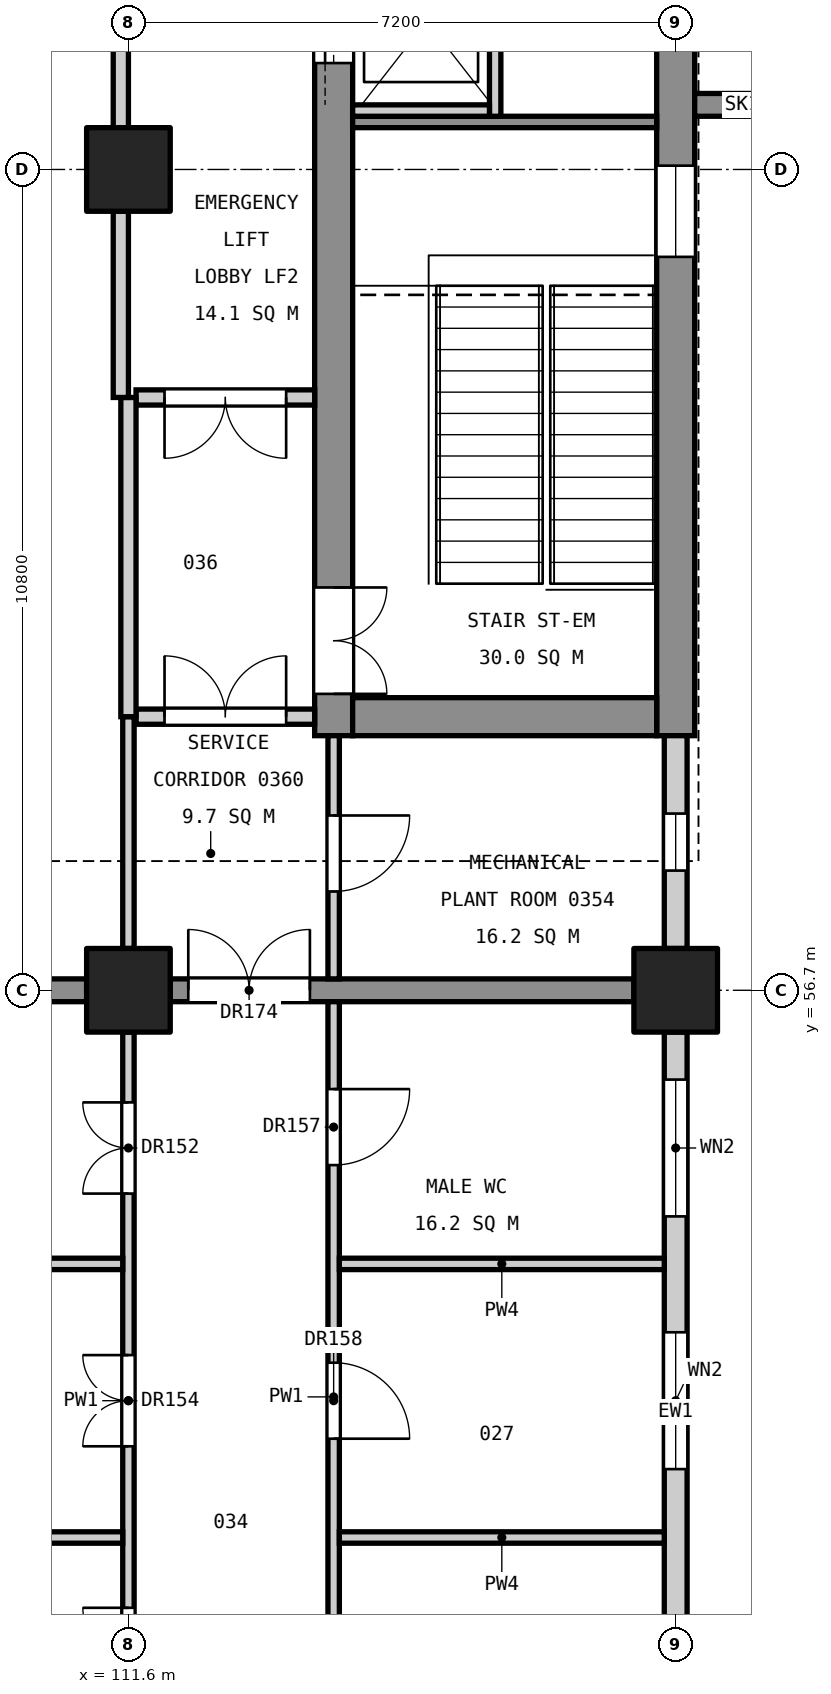
"""IFC4 building model, lengths in metres.
Left out: names, types, materials, properties, quantities, classifications, styles, units other than length and angle.
Written with IfcOpenShell. Run it as: python <this file> out.ifc"""

import sys

from ifc_helpers import new_model, si_unit, direction, frame, frame_2d, origin, origin_2d, place, context, subcontext, project, spatial, rectangle, extrude, element, fill, save


model = new_model("IFC4")
c1 = context("Model", 3, precision=1e-05, world=origin(), true_north=direction((0.0, 1.0)))
c2 = subcontext(c1, "Body", "Model", "MODEL_VIEW")
j1 = project(units=[si_unit("LENGTHUNIT", "METRE"), si_unit("PLANEANGLEUNIT", "RADIAN")], contexts=[c1])
p1 = place(None, origin())
s1 = spatial("IfcSite", under=j1, at=p1, CompositionType="ELEMENT")
p2 = place(p1, origin())
s2 = spatial("IfcBuilding", under=s1, at=p2, CompositionType="ELEMENT")
p3 = place(p2, frame((0.0, 0.0, 16.8)))
s3 = spatial("IfcBuildingStorey", under=s2, at=p3, CompositionType="ELEMENT", Elevation=16.8)
for number, where, z_axis, x_axis in (
    (1, (118.8, 56.7, 0.0), (0.0, 0.0, 1.0), (1.0, 0.0, 0.0)),
    (2, (111.6, 56.7, 0.0), (0.0, 0.0, 1.0), (1.0, 0.0, 0.0)),
    (3, (111.6, 67.5, 0.0), (0.0, 0.0, 1.0), (1.0, 0.0, 0.0)),
):
    element("IfcColumn", number, at=place(p3, frame(where, z_axis=z_axis, x_axis=x_axis)), inside=s3, PredefinedType="COLUMN", context=c2, shape_type="SweptSolid", body=[
        extrude(rectangle(XDim=1.1, YDim=1.1, at=origin_2d()), origin(), (0.0, 0.0, 1.0), 5.4),
    ])
p4 = place(p3, frame((118.8, 60.05, 0.0), z_axis=(0.0, 0.0, 1.0), x_axis=(0.0, 1.0, 0.0)))
e4 = element("IfcWall", 4, at=p4, inside=s3, PredefinedType="SHEAR", context=c2, shape_type="SweptSolid", body=[
    extrude(rectangle(XDim=14.9, YDim=0.5, at=frame_2d((7.45, 0.0))), origin(), (0.0, 0.0, 1.0), 5.15),
])
p5 = place(p4, frame((6.3, 0.0, 3.4)))
e5 = element("IfcOpeningElement", 5, at=p5, cuts=e4, PredefinedType="OPENING", context=c2, shape_type="SweptSolid", body=[
    extrude(rectangle(XDim=1.2, YDim=0.9, at=frame_2d((0.6, 0.45))), frame((0.0, 0.26, 0.0), z_axis=(0.0, -1.0, 0.0), x_axis=(1.0, 0.0, 0.0)), (0.0, 0.0, 1.0), 0.52),
])
p6 = place(p3, frame((114.3, 60.05, 0.0), z_axis=(0.0, 0.0, 1.0), x_axis=(0.0, 1.0, 0.0)))
e6 = element("IfcWall", 6, at=p6, inside=s3, PredefinedType="SHEAR", context=c2, shape_type="SweptSolid", body=[
    extrude(rectangle(XDim=14.9, YDim=0.5, at=frame_2d((7.45, 0.0))), origin(), (0.0, 0.0, 1.0), 5.15),
])
p7 = place(p6, frame((0.55, 0.0, 0.0)))
e7 = element("IfcOpeningElement", 7, at=p7, cuts=e6, PredefinedType="OPENING", context=c2, shape_type="SweptSolid", body=[
    extrude(rectangle(XDim=1.4, YDim=2.1, at=frame_2d((0.7, 1.05))), frame((0.0, 0.26, 0.0), z_axis=(0.0, -1.0, 0.0), x_axis=(1.0, 0.0, 0.0)), (0.0, 0.0, 1.0), 0.52),
])
p8 = place(p6, frame((8.85, 0.0, 0.0)))
e8 = element("IfcOpeningElement", 8, at=p8, cuts=e6, PredefinedType="OPENING", context=c2, shape_type="SweptSolid", body=[
    extrude(rectangle(XDim=1.1, YDim=2.1, at=frame_2d((0.55, 1.05))), frame((0.0, 0.26, 0.0), z_axis=(0.0, -1.0, 0.0), x_axis=(1.0, 0.0, 0.0)), (0.0, 0.0, 1.0), 0.52),
])
p9 = place(p6, frame((11.4, 0.0, 0.0)))
e9 = element("IfcOpeningElement", 9, at=p9, cuts=e6, PredefinedType="OPENING", context=c2, shape_type="SweptSolid", body=[
    extrude(rectangle(XDim=1.1, YDim=2.1, at=frame_2d((0.55, 1.05))), frame((0.0, 0.26, 0.0), z_axis=(0.0, -1.0, 0.0), x_axis=(1.0, 0.0, 0.0)), (0.0, 0.0, 1.0), 0.52),
])
p10 = place(p3, frame((118.55, 60.3, 0.0), z_axis=(0.0, 0.0, 1.0), x_axis=(-1.0, 0.0, 0.0)))
e10 = element("IfcWall", 10, at=p10, inside=s3, PredefinedType="SHEAR", context=c2, shape_type="SweptSolid", body=[
    extrude(rectangle(XDim=4.0, YDim=0.5, at=frame_2d((2.0, 0.0))), origin(), (0.0, 0.0, 1.0), 5.15),
])
p11 = place(p3, frame((119.05, 68.35, 0.0), z_axis=(0.0, 0.0, 1.0), x_axis=(1.0, 0.0, 0.0)))
e11 = element("IfcWall", 11, at=p11, inside=s3, PredefinedType="SHEAR", context=c2, shape_type="SweptSolid", body=[
    extrude(rectangle(XDim=1.25, YDim=0.3, at=frame_2d((0.625, 0.0))), origin(), (0.0, 0.0, 1.0), 5.4),
])
p12 = place(p3, frame((118.25, 56.7, 0.0), z_axis=(0.0, 0.0, 1.0), x_axis=(-1.0, 0.0, 0.0)))
e12 = element("IfcWall", 12, at=p12, inside=s3, PredefinedType="SHEAR", context=c2, shape_type="SweptSolid", body=[
    extrude(rectangle(XDim=6.1, YDim=0.3, at=frame_2d((3.05, 0.0))), origin(), (0.0, 0.0, 1.0), 5.15),
])
p13 = place(p12, frame((4.262, 0.0, 0.0)))
e13 = element("IfcOpeningElement", 13, at=p13, cuts=e12, PredefinedType="OPENING", context=c2, shape_type="SweptSolid", body=[
    extrude(rectangle(XDim=1.6, YDim=2.1, at=frame_2d((0.8, 1.05))), frame((0.0, 0.16, 0.0), z_axis=(0.0, -1.0, 0.0), x_axis=(1.0, 0.0, 0.0)), (0.0, 0.0, 1.0), 0.32),
])
p14 = place(p3, frame((111.05, 56.7, 0.0), z_axis=(0.0, 0.0, 1.0), x_axis=(-1.0, 0.0, 0.0)))
e14 = element("IfcWall", 14, at=p14, inside=s3, PredefinedType="SHEAR", context=c2, shape_type="SweptSolid", body=[
    extrude(rectangle(XDim=9.7, YDim=0.3, at=frame_2d((4.85, 0.0))), origin(), (0.0, 0.0, 1.0), 5.15),
])
p15 = place(p3, frame((118.55, 68.125, 0.0), z_axis=(0.0, 0.0, 1.0), x_axis=(-1.0, 0.0, 0.0)))
e15 = element("IfcWall", 15, at=p15, inside=s3, PredefinedType="SOLIDWALL", context=c2, shape_type="SweptSolid", body=[
    extrude(rectangle(XDim=4.0, YDim=0.15, at=frame_2d((2.0, 0.0))), origin(), (0.0, 0.0, 1.0), 5.15),
])
p16 = place(p3, frame((116.425, 68.2, 0.0), z_axis=(0.0, 0.0, 1.0), x_axis=(0.0, 1.0, 0.0)))
e16 = element("IfcWall", 16, at=p16, inside=s3, PredefinedType="SOLIDWALL", context=c2, shape_type="SweptSolid", body=[
    extrude(rectangle(XDim=2.5, YDim=0.15, at=frame_2d((1.25, 0.0))), origin(), (0.0, 0.0, 1.0), 5.4),
])
p17 = place(p3, frame((116.35, 68.275, 0.0), z_axis=(0.0, 0.0, 1.0), x_axis=(-1.0, 0.0, 0.0)))
e17 = element("IfcWall", 17, at=p17, inside=s3, PredefinedType="SOLIDWALL", context=c2, shape_type="SweptSolid", body=[
    extrude(rectangle(XDim=1.8, YDim=0.15, at=frame_2d((0.9, 0.0))), origin(), (0.0, 0.0, 1.0), 5.4),
])
p18 = place(p3, frame((118.8, 46.15, 0.0), z_axis=(0.0, 0.0, 1.0), x_axis=(0.0, 1.0, 0.0)))
e18 = element("IfcWall", 18, at=p18, inside=s3, PredefinedType="STANDARD", context=c2, shape_type="SweptSolid", body=[
    extrude(rectangle(XDim=10.0, YDim=0.3, at=frame_2d((5.0, 0.0))), origin(), (0.0, 0.0, 1.0), 4.25),
])
p19 = place(p18, frame((1.3, 0.0, 0.8)))
e19 = element("IfcOpeningElement", 19, at=p19, cuts=e18, PredefinedType="OPENING", context=c2, shape_type="SweptSolid", body=[
    extrude(rectangle(XDim=0.75, YDim=1.2, at=frame_2d((0.375, 0.6))), frame((0.0, 0.16, 0.0), z_axis=(0.0, -1.0, 0.0), x_axis=(1.0, 0.0, 0.0)), (0.0, 0.0, 1.0), 0.32),
])
p20 = place(p18, frame((4.25, 0.0, 0.9)))
e20 = element("IfcOpeningElement", 20, at=p20, cuts=e18, PredefinedType="OPENING", context=c2, shape_type="SweptSolid", body=[
    extrude(rectangle(XDim=1.8, YDim=3.0, at=frame_2d((0.9, 1.5))), frame((0.0, 0.16, 0.0), z_axis=(0.0, -1.0, 0.0), x_axis=(1.0, 0.0, 0.0)), (0.0, 0.0, 1.0), 0.32),
])
p21 = place(p18, frame((7.575, 0.0, 0.9)))
e21 = element("IfcOpeningElement", 21, at=p21, cuts=e18, PredefinedType="OPENING", context=c2, shape_type="SweptSolid", body=[
    extrude(rectangle(XDim=1.8, YDim=3.0, at=frame_2d((0.9, 1.5))), frame((0.0, 0.16, 0.0), z_axis=(0.0, -1.0, 0.0), x_axis=(1.0, 0.0, 0.0)), (0.0, 0.0, 1.0), 0.32),
])
p22 = place(p3, frame((118.8, 57.25, 0.0), z_axis=(0.0, 0.0, 1.0), x_axis=(0.0, 1.0, 0.0)))
e22 = element("IfcWall", 22, at=p22, inside=s3, PredefinedType="STANDARD", context=c2, shape_type="SweptSolid", body=[
    extrude(rectangle(XDim=2.8, YDim=0.3, at=frame_2d((1.4, 0.0))), origin(), (0.0, 0.0, 1.0), 4.25),
])
p23 = place(p22, frame((1.025, 0.0, 0.8)))
e23 = element("IfcOpeningElement", 23, at=p23, cuts=e22, PredefinedType="OPENING", context=c2, shape_type="SweptSolid", body=[
    extrude(rectangle(XDim=0.75, YDim=1.2, at=frame_2d((0.375, 0.6))), frame((0.0, 0.16, 0.0), z_axis=(0.0, -1.0, 0.0), x_axis=(1.0, 0.0, 0.0)), (0.0, 0.0, 1.0), 0.32),
])
p24 = place(p3, frame((114.3, 46.15, 0.0), z_axis=(0.0, 0.0, 1.0), x_axis=(0.0, 1.0, 0.0)))
e24 = element("IfcWall", 24, at=p24, inside=s3, PredefinedType="PARTITIONING", context=c2, shape_type="SweptSolid", body=[
    extrude(rectangle(XDim=10.4, YDim=0.15, at=frame_2d((5.2, 0.0))), origin(), (0.0, 0.0, 1.0), 4.05),
])
p25 = place(p24, frame((8.25, 0.0, 0.0)))
e25 = element("IfcOpeningElement", 25, at=p25, cuts=e24, PredefinedType="OPENING", context=c2, shape_type="SweptSolid", body=[
    extrude(rectangle(XDim=1.0, YDim=2.1, at=frame_2d((0.5, 1.05))), frame((0.0, 0.085, 0.0), z_axis=(0.0, -1.0, 0.0), x_axis=(1.0, 0.0, 0.0)), (0.0, 0.0, 1.0), 0.17),
])
p26 = place(p24, frame((4.65, 0.0, 0.0)))
e26 = element("IfcOpeningElement", 26, at=p26, cuts=e24, PredefinedType="OPENING", context=c2, shape_type="SweptSolid", body=[
    extrude(rectangle(XDim=1.0, YDim=2.1, at=frame_2d((0.5, 1.05))), frame((0.0, 0.085, 0.0), z_axis=(0.0, -1.0, 0.0), x_axis=(1.0, 0.0, 0.0)), (0.0, 0.0, 1.0), 0.17),
])
p27 = place(p24, frame((1.05, 0.0, 0.0)))
e27 = element("IfcOpeningElement", 27, at=p27, cuts=e24, PredefinedType="OPENING", context=c2, shape_type="SweptSolid", body=[
    extrude(rectangle(XDim=1.0, YDim=2.1, at=frame_2d((0.5, 1.05))), frame((0.0, 0.085, 0.0), z_axis=(0.0, -1.0, 0.0), x_axis=(1.0, 0.0, 0.0)), (0.0, 0.0, 1.0), 0.17),
])
p28 = place(p3, frame((114.3, 56.85, 0.0), z_axis=(0.0, 0.0, 1.0), x_axis=(0.0, 1.0, 0.0)))
e28 = element("IfcWall", 28, at=p28, inside=s3, PredefinedType="PARTITIONING", context=c2, shape_type="SweptSolid", body=[
    extrude(rectangle(XDim=3.2, YDim=0.15, at=frame_2d((1.6, 0.0))), origin(), (0.0, 0.0, 1.0), 4.05),
])
p29 = place(p28, frame((1.15, 0.0, 0.0)))
e29 = element("IfcOpeningElement", 29, at=p29, cuts=e28, PredefinedType="OPENING", context=c2, shape_type="SweptSolid", body=[
    extrude(rectangle(XDim=1.0, YDim=2.1, at=frame_2d((0.5, 1.05))), frame((0.0, 0.085, 0.0), z_axis=(0.0, -1.0, 0.0), x_axis=(1.0, 0.0, 0.0)), (0.0, 0.0, 1.0), 0.17),
])
for number, where, z_axis, x_axis in (
    (30, (118.65, 49.5, 0.0), (0.0, 0.0, 1.0), (-1.0, 0.0, 0.0)),
    (31, (118.65, 53.1, 0.0), (0.0, 0.0, 1.0), (-1.0, 0.0, 0.0)),
):
    element("IfcWall", number, at=place(p3, frame(where, z_axis=z_axis, x_axis=x_axis)), inside=s3, PredefinedType="PARTITIONING", context=c2, shape_type="SweptSolid", body=[
        extrude(rectangle(XDim=4.275, YDim=0.15, at=frame_2d((2.137, 0.0))), origin(), (0.0, 0.0, 1.0), 4.05),
    ])
p30 = place(p3, frame((114.05, 60.3, 0.0), z_axis=(0.0, 0.0, 1.0), x_axis=(-1.0, 0.0, 0.0)))
e32 = element("IfcWall", 32, at=p30, inside=s3, PredefinedType="PARTITIONING", context=c2, shape_type="SweptSolid", body=[
    extrude(rectangle(XDim=2.35, YDim=0.2, at=frame_2d((1.175, 0.0))), origin(), (0.0, 0.0, 1.0), 4.05),
])
p31 = place(p30, frame((0.375, 0.0, 0.0)))
e33 = element("IfcOpeningElement", 33, at=p31, cuts=e32, PredefinedType="OPENING", context=c2, shape_type="SweptSolid", body=[
    extrude(rectangle(XDim=1.6, YDim=2.1, at=frame_2d((0.8, 1.05))), frame((0.0, 0.11, 0.0), z_axis=(0.0, -1.0, 0.0), x_axis=(1.0, 0.0, 0.0)), (0.0, 0.0, 1.0), 0.22),
])
p32 = place(p3, frame((114.05, 64.5, 0.0), z_axis=(0.0, 0.0, 1.0), x_axis=(-1.0, 0.0, 0.0)))
e34 = element("IfcWall", 34, at=p32, inside=s3, PredefinedType="PARTITIONING", context=c2, shape_type="SweptSolid", body=[
    extrude(rectangle(XDim=2.35, YDim=0.2, at=frame_2d((1.175, 0.0))), origin(), (0.0, 0.0, 1.0), 4.05),
])
p33 = place(p32, frame((0.375, 0.0, 0.0)))
e35 = element("IfcOpeningElement", 35, at=p33, cuts=e34, PredefinedType="OPENING", context=c2, shape_type="SweptSolid", body=[
    extrude(rectangle(XDim=1.6, YDim=2.1, at=frame_2d((0.8, 1.05))), frame((0.0, 0.11, 0.0), z_axis=(0.0, -1.0, 0.0), x_axis=(1.0, 0.0, 0.0)), (0.0, 0.0, 1.0), 0.22),
])
p34 = place(p3, frame((111.6, 46.45, 0.0), z_axis=(0.0, 0.0, 1.0), x_axis=(0.0, 1.0, 0.0)))
e36 = element("IfcWall", 36, at=p34, inside=s3, PredefinedType="PARTITIONING", context=c2, shape_type="SweptSolid", body=[
    extrude(rectangle(XDim=9.7, YDim=0.15, at=frame_2d((4.85, 0.0))), origin(), (0.0, 0.0, 1.0), 4.15),
])
p35 = place(p34, frame((0.925, 0.0, 0.0)))
e37 = element("IfcOpeningElement", 37, at=p35, cuts=e36, PredefinedType="OPENING", context=c2, shape_type="SweptSolid", body=[
    extrude(rectangle(XDim=1.2, YDim=2.1, at=frame_2d((0.6, 1.05))), frame((0.0, 0.085, 0.0), z_axis=(0.0, -1.0, 0.0), x_axis=(1.0, 0.0, 0.0)), (0.0, 0.0, 1.0), 0.17),
])
p36 = place(p34, frame((7.575, 0.0, 0.0)))
e38 = element("IfcOpeningElement", 38, at=p36, cuts=e36, PredefinedType="OPENING", context=c2, shape_type="SweptSolid", body=[
    extrude(rectangle(XDim=1.2, YDim=2.1, at=frame_2d((0.6, 1.05))), frame((0.0, 0.085, 0.0), z_axis=(0.0, -1.0, 0.0), x_axis=(1.0, 0.0, 0.0)), (0.0, 0.0, 1.0), 0.17),
])
p37 = place(p34, frame((4.25, 0.0, 0.0)))
e39 = element("IfcOpeningElement", 39, at=p37, cuts=e36, PredefinedType="OPENING", context=c2, shape_type="SweptSolid", body=[
    extrude(rectangle(XDim=1.2, YDim=2.1, at=frame_2d((0.6, 1.05))), frame((0.0, 0.085, 0.0), z_axis=(0.0, -1.0, 0.0), x_axis=(1.0, 0.0, 0.0)), (0.0, 0.0, 1.0), 0.17),
])
p38 = place(p3, frame((111.6, 57.25, 0.0), z_axis=(0.0, 0.0, 1.0), x_axis=(0.0, 1.0, 0.0)))
e40 = element("IfcWall", 40, at=p38, inside=s3, PredefinedType="PARTITIONING", context=c2, shape_type="SweptSolid", body=[
    extrude(rectangle(XDim=3.05, YDim=0.15, at=frame_2d((1.525, 0.0))), origin(), (0.0, 0.0, 1.0), 4.15),
])
p39 = place(p3, frame((111.6, 60.3, 0.0), z_axis=(0.0, 0.0, 1.0), x_axis=(0.0, 1.0, 0.0)))
e41 = element("IfcWall", 41, at=p39, inside=s3, PredefinedType="PARTITIONING", context=c2, shape_type="SweptSolid", body=[
    extrude(rectangle(XDim=4.2, YDim=0.2, at=frame_2d((2.1, 0.0))), origin(), (0.0, 0.0, 1.0), 4.15),
])
p40 = place(p3, frame((111.5, 64.5, 0.0), z_axis=(0.0, 0.0, 1.0), x_axis=(0.0, 1.0, 0.0)))
e42 = element("IfcWall", 42, at=p40, inside=s3, PredefinedType="PARTITIONING", context=c2, shape_type="SweptSolid", body=[
    extrude(rectangle(XDim=2.45, YDim=0.2, at=frame_2d((1.225, 0.0))), origin(), (0.0, 0.0, 1.0), 4.15),
])
p41 = place(p3, frame((111.5, 68.05, 0.0), z_axis=(0.0, 0.0, 1.0), x_axis=(0.0, 1.0, 0.0)))
e43 = element("IfcWall", 43, at=p41, inside=s3, PredefinedType="PARTITIONING", context=c2, shape_type="SweptSolid", body=[
    extrude(rectangle(XDim=2.75, YDim=0.2, at=frame_2d((1.375, 0.0))), origin(), (0.0, 0.0, 1.0), 4.15),
])
for number, where, z_axis, x_axis in (
    (44, (111.525, 49.5, 0.0), (0.0, 0.0, 1.0), (-1.0, 0.0, 0.0)),
    (45, (111.525, 53.1, 0.0), (0.0, 0.0, 1.0), (-1.0, 0.0, 0.0)),
):
    element("IfcWall", number, at=place(p3, frame(where, z_axis=z_axis, x_axis=x_axis)), inside=s3, PredefinedType="PARTITIONING", context=c2, shape_type="SweptSolid", body=[
        extrude(rectangle(XDim=10.575, YDim=0.15, at=frame_2d((5.288, 0.0))), origin(), (0.0, 0.0, 1.0), 4.05),
    ])
p42 = place(p7, frame((1.4, 0.0, 0.0), z_axis=(0.0, 0.0, 1.0), x_axis=(-1.0, 0.0, 0.0)))
e46 = element("IfcDoor", 46, at=p42, inside=s3, OperationType="DOUBLE_DOOR_SINGLE_SWING", PredefinedType="DOOR", context=c2, shape_type="SweptSolid", body=[
    extrude(rectangle(XDim=1.4, YDim=2.1, at=frame_2d((0.7, 1.05))), frame((0.0, 0.025, 0.0), z_axis=(0.0, -1.0, 0.0), x_axis=(1.0, 0.0, 0.0)), (0.0, 0.0, 1.0), 0.05),
])
fill(e7, e46)
p43 = place(p8, origin())
e47 = element("IfcDoor", 47, at=p43, inside=s3, OperationType="SLIDING_TO_LEFT", PredefinedType="DOOR", context=c2, shape_type="SweptSolid", body=[
    extrude(rectangle(XDim=1.1, YDim=2.1, at=frame_2d((0.55, 1.05))), frame((0.0, 0.025, 0.0), z_axis=(0.0, -1.0, 0.0), x_axis=(1.0, 0.0, 0.0)), (0.0, 0.0, 1.0), 0.05),
])
fill(e8, e47)
p44 = place(p20, origin())
e48 = element("IfcWindow", 48, at=p44, inside=s3, PartitioningType="SINGLE_PANEL", PredefinedType="WINDOW", context=c2, shape_type="SweptSolid", body=[
    extrude(rectangle(XDim=1.8, YDim=3.0, at=frame_2d((0.9, 1.5))), frame((0.0, 0.03, 0.0), z_axis=(0.0, -1.0, 0.0), x_axis=(1.0, 0.0, 0.0)), (0.0, 0.0, 1.0), 0.06),
])
fill(e20, e48)
p45 = place(p21, origin())
e49 = element("IfcWindow", 49, at=p45, inside=s3, PartitioningType="SINGLE_PANEL", PredefinedType="WINDOW", context=c2, shape_type="SweptSolid", body=[
    extrude(rectangle(XDim=1.8, YDim=3.0, at=frame_2d((0.9, 1.5))), frame((0.0, 0.03, 0.0), z_axis=(0.0, -1.0, 0.0), x_axis=(1.0, 0.0, 0.0)), (0.0, 0.0, 1.0), 0.06),
])
fill(e21, e49)
p46 = place(p23, origin())
e50 = element("IfcWindow", 50, at=p46, inside=s3, PartitioningType="SINGLE_PANEL", PredefinedType="WINDOW", context=c2, shape_type="SweptSolid", body=[
    extrude(rectangle(XDim=0.75, YDim=1.2, at=frame_2d((0.375, 0.6))), frame((0.0, 0.03, 0.0), z_axis=(0.0, -1.0, 0.0), x_axis=(1.0, 0.0, 0.0)), (0.0, 0.0, 1.0), 0.06),
])
fill(e23, e50)
p47 = place(p5, origin())
e51 = element("IfcWindow", 51, at=p47, inside=s3, PartitioningType="SINGLE_PANEL", PredefinedType="WINDOW", context=c2, shape_type="SweptSolid", body=[
    extrude(rectangle(XDim=1.2, YDim=0.9, at=frame_2d((0.6, 0.45))), frame((0.0, 0.03, 0.0), z_axis=(0.0, -1.0, 0.0), x_axis=(1.0, 0.0, 0.0)), (0.0, 0.0, 1.0), 0.06),
])
fill(e5, e51)
p48 = place(p35, origin())
e52 = element("IfcDoor", 52, at=p48, inside=s3, OperationType="DOUBLE_DOOR_SINGLE_SWING", PredefinedType="DOOR", context=c2, shape_type="SweptSolid", body=[
    extrude(rectangle(XDim=1.2, YDim=2.1, at=frame_2d((0.6, 1.05))), frame((0.0, 0.025, 0.0), z_axis=(0.0, -1.0, 0.0), x_axis=(1.0, 0.0, 0.0)), (0.0, 0.0, 1.0), 0.05),
])
fill(e37, e52)
p49 = place(p36, origin())
e53 = element("IfcDoor", 53, at=p49, inside=s3, OperationType="DOUBLE_DOOR_SINGLE_SWING", PredefinedType="DOOR", context=c2, shape_type="SweptSolid", body=[
    extrude(rectangle(XDim=1.2, YDim=2.1, at=frame_2d((0.6, 1.05))), frame((0.0, 0.025, 0.0), z_axis=(0.0, -1.0, 0.0), x_axis=(1.0, 0.0, 0.0)), (0.0, 0.0, 1.0), 0.05),
])
fill(e38, e53)
p50 = place(p37, origin())
e54 = element("IfcDoor", 54, at=p50, inside=s3, OperationType="DOUBLE_DOOR_SINGLE_SWING", PredefinedType="DOOR", context=c2, shape_type="SweptSolid", body=[
    extrude(rectangle(XDim=1.2, YDim=2.1, at=frame_2d((0.6, 1.05))), frame((0.0, 0.025, 0.0), z_axis=(0.0, -1.0, 0.0), x_axis=(1.0, 0.0, 0.0)), (0.0, 0.0, 1.0), 0.05),
])
fill(e39, e54)
p51 = place(p25, frame((1.0, 0.0, 0.0), z_axis=(0.0, 0.0, 1.0), x_axis=(-1.0, 0.0, 0.0)))
e55 = element("IfcDoor", 55, at=p51, inside=s3, OperationType="SINGLE_SWING_LEFT", PredefinedType="DOOR", context=c2, shape_type="SweptSolid", body=[
    extrude(rectangle(XDim=1.0, YDim=2.1, at=frame_2d((0.5, 1.05))), frame((0.0, 0.025, 0.0), z_axis=(0.0, -1.0, 0.0), x_axis=(1.0, 0.0, 0.0)), (0.0, 0.0, 1.0), 0.05),
])
fill(e25, e55)
p52 = place(p26, frame((1.0, 0.0, 0.0), z_axis=(0.0, 0.0, 1.0), x_axis=(-1.0, 0.0, 0.0)))
e56 = element("IfcDoor", 56, at=p52, inside=s3, OperationType="SINGLE_SWING_RIGHT", PredefinedType="DOOR", context=c2, shape_type="SweptSolid", body=[
    extrude(rectangle(XDim=1.0, YDim=2.1, at=frame_2d((0.5, 1.05))), frame((0.0, 0.025, 0.0), z_axis=(0.0, -1.0, 0.0), x_axis=(1.0, 0.0, 0.0)), (0.0, 0.0, 1.0), 0.05),
])
fill(e26, e56)
p53 = place(p29, frame((1.0, 0.0, 0.0), z_axis=(0.0, 0.0, 1.0), x_axis=(-1.0, 0.0, 0.0)))
e57 = element("IfcDoor", 57, at=p53, inside=s3, OperationType="SINGLE_SWING_LEFT", PredefinedType="DOOR", context=c2, shape_type="SweptSolid", body=[
    extrude(rectangle(XDim=1.0, YDim=2.1, at=frame_2d((0.5, 1.05))), frame((0.0, 0.025, 0.0), z_axis=(0.0, -1.0, 0.0), x_axis=(1.0, 0.0, 0.0)), (0.0, 0.0, 1.0), 0.05),
])
fill(e29, e57)
p54 = place(p31, frame((1.6, 0.0, 0.0), z_axis=(0.0, 0.0, 1.0), x_axis=(-1.0, 0.0, 0.0)))
e58 = element("IfcDoor", 58, at=p54, inside=s3, OperationType="DOUBLE_DOOR_SINGLE_SWING", PredefinedType="DOOR", context=c2, shape_type="SweptSolid", body=[
    extrude(rectangle(XDim=1.6, YDim=2.1, at=frame_2d((0.8, 1.05))), frame((0.0, 0.025, 0.0), z_axis=(0.0, -1.0, 0.0), x_axis=(1.0, 0.0, 0.0)), (0.0, 0.0, 1.0), 0.05),
])
fill(e33, e58)
p55 = place(p33, origin())
e59 = element("IfcDoor", 59, at=p55, inside=s3, OperationType="DOUBLE_DOOR_SINGLE_SWING", PredefinedType="DOOR", context=c2, shape_type="SweptSolid", body=[
    extrude(rectangle(XDim=1.6, YDim=2.1, at=frame_2d((0.8, 1.05))), frame((0.0, 0.025, 0.0), z_axis=(0.0, -1.0, 0.0), x_axis=(1.0, 0.0, 0.0)), (0.0, 0.0, 1.0), 0.05),
])
fill(e35, e59)
p56 = place(p13, frame((1.6, 0.0, 0.0), z_axis=(0.0, 0.0, 1.0), x_axis=(-1.0, 0.0, 0.0)))
e60 = element("IfcDoor", 60, at=p56, inside=s3, OperationType="DOUBLE_DOOR_SINGLE_SWING", PredefinedType="DOOR", context=c2, shape_type="SweptSolid", body=[
    extrude(rectangle(XDim=1.6, YDim=2.1, at=frame_2d((0.8, 1.05))), frame((0.0, 0.025, 0.0), z_axis=(0.0, -1.0, 0.0), x_axis=(1.0, 0.0, 0.0)), (0.0, 0.0, 1.0), 0.05),
])
fill(e13, e60)
save(model, sys.argv[1])
